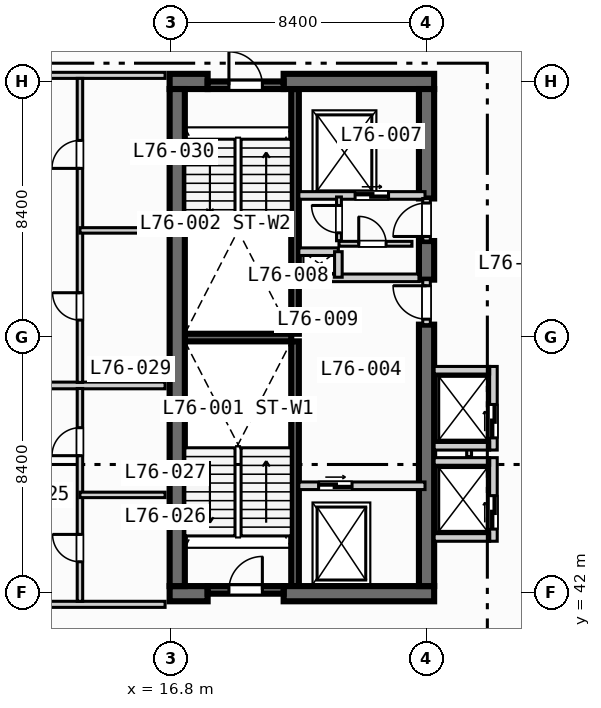
"""IFC4 building model, lengths in metres.
Left out: names, types, materials, properties, quantities, classifications, styles, units other than length and angle.
Written with IfcOpenShell. Run it as: python <this file> out.ifc"""

import sys

from ifc_helpers import new_model, si_unit, direction, frame, frame_2d, origin, place, context, subcontext, project, spatial, rectangle, extrude, element, fill, save


model = new_model("IFC4")
c1 = context("Model", 3, precision=1e-05, world=origin(), true_north=direction((0.0, 1.0)))
c2 = subcontext(c1, "Body", "Model", "MODEL_VIEW")
j1 = project(units=[si_unit("LENGTHUNIT", "METRE"), si_unit("PLANEANGLEUNIT", "RADIAN")], contexts=[c1])
p1 = place(None, origin())
s1 = spatial("IfcSite", under=j1, at=p1, CompositionType="ELEMENT")
p2 = place(p1, origin())
s2 = spatial("IfcBuilding", under=s1, at=p2, CompositionType="ELEMENT")
p3 = place(p2, frame((0.0, 0.0, 308.6)))
s3 = spatial("IfcBuildingStorey", under=s2, at=p3, CompositionType="ELEMENT", Elevation=308.6)
for number, where, z_axis, x_axis in (
    (1, (20.875, 42.2, 0.0), (0.0, 0.0, 1.0), (0.0, 1.0, 0.0)),
    (2, (20.875, 50.5, 0.0), (0.0, 0.0, 1.0), (0.0, 1.0, 0.0)),
):
    element("IfcWall", number, at=place(p3, frame(where, z_axis=z_axis, x_axis=x_axis)), inside=s3, PredefinedType="SOLIDWALL", context=c2, shape_type="SweptSolid", body=[
        extrude(rectangle(XDim=8.05, YDim=0.25, at=frame_2d((4.025, 0.0))), origin(), (0.0, 0.0, 1.0), 3.67),
    ])
p4 = place(p3, frame((17.25, 50.375, 0.0), z_axis=(0.0, 0.0, 1.0), x_axis=(1.0, 0.0, 0.0)))
e3 = element("IfcWall", 3, at=p4, inside=s3, PredefinedType="SOLIDWALL", context=c2, shape_type="SweptSolid", body=[
    extrude(rectangle(XDim=3.5, YDim=0.25, at=frame_2d((1.75, 0.0))), origin(), (0.0, 0.0, 1.0), 3.67),
])
p5 = place(p3, frame((16.75, 41.95, 0.0), z_axis=(0.0, 0.0, 1.0), x_axis=(1.0, 0.0, 0.0)))
e4 = element("IfcWall", 4, at=p5, inside=s3, PredefinedType="SHEAR", context=c2, shape_type="SweptSolid", body=[
    extrude(rectangle(XDim=1.25, YDim=0.5, at=frame_2d((0.625, 0.0))), origin(), (0.0, 0.0, 1.0), 3.67),
])
p6 = place(p3, frame((20.5, 41.95, 0.0), z_axis=(0.0, 0.0, 1.0), x_axis=(1.0, 0.0, 0.0)))
e5 = element("IfcWall", 5, at=p6, inside=s3, PredefinedType="SHEAR", context=c2, shape_type="SweptSolid", body=[
    extrude(rectangle(XDim=4.95, YDim=0.5, at=frame_2d((2.475, 0.0))), origin(), (0.0, 0.0, 1.0), 3.67),
])
p7 = place(p3, frame((16.75, 58.8, 0.0), z_axis=(0.0, 0.0, 1.0), x_axis=(1.0, 0.0, 0.0)))
e6 = element("IfcWall", 6, at=p7, inside=s3, PredefinedType="SHEAR", context=c2, shape_type="SweptSolid", body=[
    extrude(rectangle(XDim=1.25, YDim=0.5, at=frame_2d((0.625, 0.0))), origin(), (0.0, 0.0, 1.0), 3.67),
])
p8 = place(p3, frame((20.5, 58.8, 0.0), z_axis=(0.0, 0.0, 1.0), x_axis=(1.0, 0.0, 0.0)))
e7 = element("IfcWall", 7, at=p8, inside=s3, PredefinedType="SHEAR", context=c2, shape_type="SweptSolid", body=[
    extrude(rectangle(XDim=4.95, YDim=0.5, at=frame_2d((2.475, 0.0))), origin(), (0.0, 0.0, 1.0), 3.67),
])
p9 = place(p3, frame((17.0, 42.2, 0.0), z_axis=(0.0, 0.0, 1.0), x_axis=(0.0, 1.0, 0.0)))
e8 = element("IfcWall", 8, at=p9, inside=s3, PredefinedType="SHEAR", context=c2, shape_type="SweptSolid", body=[
    extrude(rectangle(XDim=16.35, YDim=0.5, at=frame_2d((8.175, 0.0))), origin(), (0.0, 0.0, 1.0), 3.67),
])
p10 = place(p3, frame((25.2, 42.2, 0.0), z_axis=(0.0, 0.0, 1.0), x_axis=(0.0, 1.0, 0.0)))
e9 = element("IfcWall", 9, at=p10, inside=s3, PredefinedType="SHEAR", context=c2, shape_type="SweptSolid", body=[
    extrude(rectangle(XDim=8.6, YDim=0.5, at=frame_2d((4.3, 0.0))), origin(), (0.0, 0.0, 1.0), 3.67),
])
p11 = place(p3, frame((25.2, 52.28, 0.0), z_axis=(0.0, 0.0, 1.0), x_axis=(0.0, 1.0, 0.0)))
e10 = element("IfcWall", 10, at=p11, inside=s3, PredefinedType="SHEAR", context=c2, shape_type="SweptSolid", body=[
    extrude(rectangle(XDim=1.27, YDim=0.5, at=frame_2d((0.635, 0.0))), origin(), (0.0, 0.0, 1.0), 3.67),
])
p12 = place(p3, frame((25.2, 54.95, 0.0), z_axis=(0.0, 0.0, 1.0), x_axis=(0.0, 1.0, 0.0)))
e11 = element("IfcWall", 11, at=p12, inside=s3, PredefinedType="SHEAR", context=c2, shape_type="SweptSolid", body=[
    extrude(rectangle(XDim=3.6, YDim=0.5, at=frame_2d((1.8, 0.0))), origin(), (0.0, 0.0, 1.0), 3.67),
])
p13 = place(p3, frame((18.0, 42.075, 0.0), z_axis=(0.0, 0.0, 1.0), x_axis=(1.0, 0.0, 0.0)))
e12 = element("IfcWall", 12, at=p13, inside=s3, PredefinedType="SOLIDWALL", context=c2, shape_type="SweptSolid", body=[
    extrude(rectangle(XDim=2.5, YDim=0.25, at=frame_2d((1.25, 0.0))), origin(), (0.0, 0.0, 1.0), 3.67),
])
p14 = place(p13, frame((0.7, 0.0, 0.0)))
e13 = element("IfcOpeningElement", 13, at=p14, cuts=e12, PredefinedType="OPENING", context=c2, shape_type="SweptSolid", body=[
    extrude(rectangle(XDim=1.1, YDim=2.15, at=frame_2d((0.55, 1.075))), frame((0.0, 0.135, 0.0), z_axis=(0.0, -1.0, 0.0), x_axis=(1.0, 0.0, 0.0)), (0.0, 0.0, 1.0), 0.27),
])
p15 = place(p3, frame((18.0, 58.675, 0.0), z_axis=(0.0, 0.0, 1.0), x_axis=(1.0, 0.0, 0.0)))
e14 = element("IfcWall", 14, at=p15, inside=s3, PredefinedType="SOLIDWALL", context=c2, shape_type="SweptSolid", body=[
    extrude(rectangle(XDim=2.5, YDim=0.25, at=frame_2d((1.25, 0.0))), origin(), (0.0, 0.0, 1.0), 3.67),
])
p16 = place(p15, frame((0.7, 0.0, 0.0)))
e15 = element("IfcOpeningElement", 15, at=p16, cuts=e14, PredefinedType="OPENING", context=c2, shape_type="SweptSolid", body=[
    extrude(rectangle(XDim=1.1, YDim=2.15, at=frame_2d((0.55, 1.075))), frame((0.0, 0.135, 0.0), z_axis=(0.0, -1.0, 0.0), x_axis=(1.0, 0.0, 0.0)), (0.0, 0.0, 1.0), 0.27),
])
p17 = place(p3, frame((21.0, 45.5, 0.0), z_axis=(0.0, 0.0, 1.0), x_axis=(1.0, 0.0, 0.0)))
e16 = element("IfcWall", 16, at=p17, inside=s3, PredefinedType="SOLIDWALL", context=c2, shape_type="SweptSolid", body=[
    extrude(rectangle(XDim=4.15, YDim=0.25, at=frame_2d((2.075, 0.0))), origin(), (0.0, 0.0, 1.0), 3.67),
])
p18 = place(p17, frame((0.65, 0.0, 0.0)))
e17 = element("IfcOpeningElement", 17, at=p18, cuts=e16, PredefinedType="OPENING", context=c2, shape_type="SweptSolid", body=[
    extrude(rectangle(XDim=1.1, YDim=2.15, at=frame_2d((0.55, 1.075))), frame((0.0, 0.135, 0.0), z_axis=(0.0, -1.0, 0.0), x_axis=(1.0, 0.0, 0.0)), (0.0, 0.0, 1.0), 0.27),
])
p19 = place(p3, frame((25.2, 50.8, 0.0), z_axis=(0.0, 0.0, 1.0), x_axis=(0.0, 1.0, 0.0)))
e18 = element("IfcWall", 18, at=p19, inside=s3, PredefinedType="SOLIDWALL", context=c2, shape_type="SweptSolid", body=[
    extrude(rectangle(XDim=1.48, YDim=0.25, at=frame_2d((0.74, 0.0))), origin(), (0.0, 0.0, 1.0), 3.67),
])
p20 = place(p19, frame((0.18, 0.0, 0.0)))
e19 = element("IfcOpeningElement", 19, at=p20, cuts=e18, PredefinedType="OPENING", context=c2, shape_type="SweptSolid", body=[
    extrude(rectangle(XDim=1.1, YDim=2.15, at=frame_2d((0.55, 1.075))), frame((0.0, 0.135, 0.0), z_axis=(0.0, -1.0, 0.0), x_axis=(1.0, 0.0, 0.0)), (0.0, 0.0, 1.0), 0.27),
])
p21 = place(p3, frame((21.0, 52.34, 0.0), z_axis=(0.0, 0.0, 1.0), x_axis=(1.0, 0.0, 0.0)))
e20 = element("IfcWall", 20, at=p21, inside=s3, PredefinedType="SOLIDWALL", context=c2, shape_type="SweptSolid", body=[
    extrude(rectangle(XDim=3.95, YDim=0.25, at=frame_2d((1.975, 0.0))), origin(), (0.0, 0.0, 1.0), 3.67),
])
p22 = place(p3, frame((21.0, 55.05, 0.0), z_axis=(0.0, 0.0, 1.0), x_axis=(1.0, 0.0, 0.0)))
e21 = element("IfcWall", 21, at=p22, inside=s3, PredefinedType="SOLIDWALL", context=c2, shape_type="SweptSolid", body=[
    extrude(rectangle(XDim=4.15, YDim=0.25, at=frame_2d((2.075, 0.0))), origin(), (0.0, 0.0, 1.0), 3.67),
])
p23 = place(p22, frame((1.85, 0.0, 0.0)))
e22 = element("IfcOpeningElement", 22, at=p23, cuts=e21, PredefinedType="OPENING", context=c2, shape_type="SweptSolid", body=[
    extrude(rectangle(XDim=1.1, YDim=2.15, at=frame_2d((0.55, 1.075))), frame((0.0, 0.135, 0.0), z_axis=(0.0, -1.0, 0.0), x_axis=(1.0, 0.0, 0.0)), (0.0, 0.0, 1.0), 0.27),
])
p24 = place(p3, frame((25.2, 53.55, 0.0), z_axis=(0.0, 0.0, 1.0), x_axis=(0.0, 1.0, 0.0)))
e23 = element("IfcWall", 23, at=p24, inside=s3, PredefinedType="SOLIDWALL", context=c2, shape_type="SweptSolid", body=[
    extrude(rectangle(XDim=1.4, YDim=0.25, at=frame_2d((0.7, 0.0))), origin(), (0.0, 0.0, 1.0), 3.67),
])
p25 = place(p24, frame((0.15, 0.0, 0.0)))
e24 = element("IfcOpeningElement", 24, at=p25, cuts=e23, PredefinedType="OPENING", context=c2, shape_type="SweptSolid", body=[
    extrude(rectangle(XDim=1.1, YDim=2.15, at=frame_2d((0.55, 1.075))), frame((0.0, 0.135, 0.0), z_axis=(0.0, -1.0, 0.0), x_axis=(1.0, 0.0, 0.0)), (0.0, 0.0, 1.0), 0.27),
])
p26 = place(p3, frame((21.0, 53.2, 0.0), z_axis=(0.0, 0.0, 1.0), x_axis=(1.0, 0.0, 0.0)))
e25 = element("IfcWall", 25, at=p26, inside=s3, PredefinedType="SOLIDWALL", context=c2, shape_type="SweptSolid", body=[
    extrude(rectangle(XDim=1.3, YDim=0.25, at=frame_2d((0.65, 0.0))), origin(), (0.0, 0.0, 1.0), 3.67),
])
p27 = place(p3, frame((22.3, 52.36, 0.0), z_axis=(0.0, 0.0, 1.0), x_axis=(0.0, 1.0, 0.0)))
e26 = element("IfcWall", 26, at=p27, inside=s3, PredefinedType="SOLIDWALL", context=c2, shape_type="SweptSolid", body=[
    extrude(rectangle(XDim=0.84, YDim=0.25, at=frame_2d((0.42, 0.0))), origin(), (0.0, 0.0, 1.0), 3.67),
])
p28 = place(p3, frame((22.32, 53.56, 0.0), z_axis=(0.0, 0.0, 1.0), x_axis=(0.0, 1.0, 0.0)))
e27 = element("IfcWall", 27, at=p28, inside=s3, PredefinedType="PARTITIONING", context=c2, shape_type="SweptSolid", body=[
    extrude(rectangle(XDim=1.44, YDim=0.16, at=frame_2d((0.72, 0.0))), origin(), (0.0, 0.0, 1.0), 3.67),
])
p29 = place(p28, frame((0.26, 0.0, 0.0)))
e28 = element("IfcOpeningElement", 28, at=p29, cuts=e27, PredefinedType="OPENING", context=c2, shape_type="SweptSolid", body=[
    extrude(rectangle(XDim=0.9, YDim=2.1, at=frame_2d((0.45, 1.05))), frame((0.0, 0.09, 0.0), z_axis=(0.0, -1.0, 0.0), x_axis=(1.0, 0.0, 0.0)), (0.0, 0.0, 1.0), 0.18),
])
p30 = place(p3, frame((22.32, 53.46, 0.0), z_axis=(0.0, 0.0, 1.0), x_axis=(1.0, 0.0, 0.0)))
e29 = element("IfcWall", 29, at=p30, inside=s3, PredefinedType="PARTITIONING", context=c2, shape_type="SweptSolid", body=[
    extrude(rectangle(XDim=2.4, YDim=0.16, at=frame_2d((1.2, 0.0))), origin(), (0.0, 0.0, 1.0), 3.67),
])
p31 = place(p30, frame((0.65, 0.0, 0.0)))
e30 = element("IfcOpeningElement", 30, at=p31, cuts=e29, PredefinedType="OPENING", context=c2, shape_type="SweptSolid", body=[
    extrude(rectangle(XDim=0.9, YDim=2.1, at=frame_2d((0.45, 1.05))), frame((0.0, 0.09, 0.0), z_axis=(0.0, -1.0, 0.0), x_axis=(1.0, 0.0, 0.0)), (0.0, 0.0, 1.0), 0.18),
])
p32 = place(p3, frame((27.4, 43.675, 0.0), z_axis=(0.0, 0.0, 1.0), x_axis=(0.0, 1.0, 0.0)))
e31 = element("IfcWall", 31, at=p32, inside=s3, PredefinedType="SOLIDWALL", context=c2, shape_type="SweptSolid", body=[
    extrude(rectangle(XDim=2.75, YDim=0.25, at=frame_2d((1.375, 0.0))), origin(), (0.0, 0.0, 1.0), 3.67),
])
p33 = place(p32, frame((0.4, 0.0, 0.0)))
e32 = element("IfcOpeningElement", 32, at=p33, cuts=e31, PredefinedType="OPENING", context=c2, shape_type="SweptSolid", body=[
    extrude(rectangle(XDim=1.1, YDim=2.15, at=frame_2d((0.55, 1.075))), frame((0.0, 0.135, 0.0), z_axis=(0.0, -1.0, 0.0), x_axis=(1.0, 0.0, 0.0)), (0.0, 0.0, 1.0), 0.27),
])
for number, where, z_axis, x_axis in (
    (33, (25.45, 43.8, 0.0), (0.0, 0.0, 1.0), (1.0, 0.0, 0.0)),
    (34, (25.45, 46.3, 0.0), (0.0, 0.0, 1.0), (1.0, 0.0, 0.0)),
):
    element("IfcWall", number, at=place(p3, frame(where, z_axis=z_axis, x_axis=x_axis)), inside=s3, PredefinedType="SOLIDWALL", context=c2, shape_type="SweptSolid", body=[
        extrude(rectangle(XDim=1.825, YDim=0.25, at=frame_2d((0.913, 0.0))), origin(), (0.0, 0.0, 1.0), 3.67),
    ])
p34 = place(p3, frame((26.6, 46.46, 0.0), z_axis=(0.0, 0.0, 1.0), x_axis=(0.0, 1.0, 0.0)))
e35 = element("IfcWall", 35, at=p34, inside=s3, PredefinedType="PARTITIONING", context=c2, shape_type="SweptSolid", body=[
    extrude(rectangle(XDim=0.88, YDim=0.16, at=frame_2d((0.44, 0.0))), origin(), (0.0, 0.0, 1.0), 3.67),
])
p35 = place(p3, frame((27.4, 46.675, 0.0), z_axis=(0.0, 0.0, 1.0), x_axis=(0.0, 1.0, 0.0)))
e36 = element("IfcWall", 36, at=p35, inside=s3, PredefinedType="SOLIDWALL", context=c2, shape_type="SweptSolid", body=[
    extrude(rectangle(XDim=2.75, YDim=0.25, at=frame_2d((1.375, 0.0))), origin(), (0.0, 0.0, 1.0), 3.67),
])
p36 = place(p35, frame((0.4, 0.0, 0.0)))
e37 = element("IfcOpeningElement", 37, at=p36, cuts=e36, PredefinedType="OPENING", context=c2, shape_type="SweptSolid", body=[
    extrude(rectangle(XDim=1.1, YDim=2.15, at=frame_2d((0.55, 1.075))), frame((0.0, 0.135, 0.0), z_axis=(0.0, -1.0, 0.0), x_axis=(1.0, 0.0, 0.0)), (0.0, 0.0, 1.0), 0.27),
])
for number, where, z_axis, x_axis in (
    (38, (25.45, 46.8, 0.0), (0.0, 0.0, 1.0), (1.0, 0.0, 0.0)),
    (39, (25.45, 49.3, 0.0), (0.0, 0.0, 1.0), (1.0, 0.0, 0.0)),
):
    element("IfcWall", number, at=place(p3, frame(where, z_axis=z_axis, x_axis=x_axis)), inside=s3, PredefinedType="SOLIDWALL", context=c2, shape_type="SweptSolid", body=[
        extrude(rectangle(XDim=1.825, YDim=0.25, at=frame_2d((0.913, 0.0))), origin(), (0.0, 0.0, 1.0), 3.67),
    ])
p37 = place(p3, frame((8.65, 41.6, 0.0), z_axis=(0.0, 0.0, 1.0), x_axis=(1.0, 0.0, 0.0)))
e40 = element("IfcWall", 40, at=p37, inside=s3, PredefinedType="PARTITIONING", context=c2, shape_type="SweptSolid", body=[
    extrude(rectangle(XDim=7.95, YDim=0.2, at=frame_2d((3.975, 0.0))), origin(), (0.0, 0.0, 1.0), 3.67),
])
p38 = place(p37, frame((2.0, 0.0, 0.0)))
e41 = element("IfcOpeningElement", 41, at=p38, cuts=e40, PredefinedType="OPENING", context=c2, shape_type="SweptSolid", body=[
    extrude(rectangle(XDim=1.0, YDim=2.15, at=frame_2d((0.5, 1.075))), frame((0.0, 0.11, 0.0), z_axis=(0.0, -1.0, 0.0), x_axis=(1.0, 0.0, 0.0)), (0.0, 0.0, 1.0), 0.22),
])
p39 = place(p3, frame((8.65, 59.0, 0.0), z_axis=(0.0, 0.0, 1.0), x_axis=(1.0, 0.0, 0.0)))
e42 = element("IfcWall", 42, at=p39, inside=s3, PredefinedType="PARTITIONING", context=c2, shape_type="SweptSolid", body=[
    extrude(rectangle(XDim=7.95, YDim=0.2, at=frame_2d((3.975, 0.0))), origin(), (0.0, 0.0, 1.0), 3.07),
])
p40 = place(p39, frame((2.0, 0.0, 0.0)))
e43 = element("IfcOpeningElement", 43, at=p40, cuts=e42, PredefinedType="OPENING", context=c2, shape_type="SweptSolid", body=[
    extrude(rectangle(XDim=1.0, YDim=2.15, at=frame_2d((0.5, 1.075))), frame((0.0, 0.11, 0.0), z_axis=(0.0, -1.0, 0.0), x_axis=(1.0, 0.0, 0.0)), (0.0, 0.0, 1.0), 0.22),
])
p41 = place(p3, frame((8.65, 48.8, 0.0), z_axis=(0.0, 0.0, 1.0), x_axis=(1.0, 0.0, 0.0)))
e44 = element("IfcWall", 44, at=p41, inside=s3, PredefinedType="PARTITIONING", context=c2, shape_type="SweptSolid", body=[
    extrude(rectangle(XDim=7.95, YDim=0.22, at=frame_2d((3.975, 0.0))), origin(), (0.0, 0.0, 1.0), 3.67),
])
p42 = place(p3, frame((13.8, 41.7, 0.0), z_axis=(0.0, 0.0, 1.0), x_axis=(0.0, 1.0, 0.0)))
e45 = element("IfcWall", 45, at=p42, inside=s3, PredefinedType="PLUMBINGWALL", context=c2, shape_type="SweptSolid", body=[
    extrude(rectangle(XDim=7.0, YDim=0.18, at=frame_2d((3.5, 0.0))), origin(), (0.0, 0.0, 1.0), 3.67),
])
p43 = place(p42, frame((1.3, 0.0, 0.0)))
e46 = element("IfcOpeningElement", 46, at=p43, cuts=e45, PredefinedType="OPENING", context=c2, shape_type="SweptSolid", body=[
    extrude(rectangle(XDim=0.9, YDim=2.1, at=frame_2d((0.45, 1.05))), frame((0.0, 0.1, 0.0), z_axis=(0.0, -1.0, 0.0), x_axis=(1.0, 0.0, 0.0)), (0.0, 0.0, 1.0), 0.2),
])
p44 = place(p42, frame((4.79, 0.0, 0.0)))
e47 = element("IfcOpeningElement", 47, at=p44, cuts=e45, PredefinedType="OPENING", context=c2, shape_type="SweptSolid", body=[
    extrude(rectangle(XDim=0.92, YDim=2.1, at=frame_2d((0.46, 1.05))), frame((0.0, 0.1, 0.0), z_axis=(0.0, -1.0, 0.0), x_axis=(1.0, 0.0, 0.0)), (0.0, 0.0, 1.0), 0.2),
])
p45 = place(p3, frame((13.8, 45.2, 0.0), z_axis=(0.0, 0.0, 1.0), x_axis=(1.0, 0.0, 0.0)))
e48 = element("IfcWall", 48, at=p45, inside=s3, PredefinedType="PLUMBINGWALL", context=c2, shape_type="SweptSolid", body=[
    extrude(rectangle(XDim=2.8, YDim=0.18, at=frame_2d((1.4, 0.0))), origin(), (0.0, 0.0, 1.0), 3.67),
])
p46 = place(p3, frame((13.8, 48.9, 0.0), z_axis=(0.0, 0.0, 1.0), x_axis=(0.0, 1.0, 0.0)))
e49 = element("IfcWall", 49, at=p46, inside=s3, PredefinedType="PLUMBINGWALL", context=c2, shape_type="SweptSolid", body=[
    extrude(rectangle(XDim=10.0, YDim=0.18, at=frame_2d((5.0, 0.0))), origin(), (0.0, 0.0, 1.0), 3.67),
])
p47 = place(p46, frame((2.05, 0.0, 0.0)))
e50 = element("IfcOpeningElement", 50, at=p47, cuts=e49, PredefinedType="OPENING", context=c2, shape_type="SweptSolid", body=[
    extrude(rectangle(XDim=0.9, YDim=2.1, at=frame_2d((0.45, 1.05))), frame((0.0, 0.1, 0.0), z_axis=(0.0, -1.0, 0.0), x_axis=(1.0, 0.0, 0.0)), (0.0, 0.0, 1.0), 0.2),
])
p48 = place(p46, frame((7.04, 0.0, 0.0)))
e51 = element("IfcOpeningElement", 51, at=p48, cuts=e49, PredefinedType="OPENING", context=c2, shape_type="SweptSolid", body=[
    extrude(rectangle(XDim=0.92, YDim=2.1, at=frame_2d((0.46, 1.05))), frame((0.0, 0.1, 0.0), z_axis=(0.0, -1.0, 0.0), x_axis=(1.0, 0.0, 0.0)), (0.0, 0.0, 1.0), 0.2),
])
p49 = place(p3, frame((13.8, 53.9, 0.0), z_axis=(0.0, 0.0, 1.0), x_axis=(1.0, 0.0, 0.0)))
e52 = element("IfcWall", 52, at=p49, inside=s3, PredefinedType="PLUMBINGWALL", context=c2, shape_type="SweptSolid", body=[
    extrude(rectangle(XDim=2.8, YDim=0.18, at=frame_2d((1.4, 0.0))), origin(), (0.0, 0.0, 1.0), 3.67),
])
p50 = place(p14, origin())
e53 = element("IfcDoor", 53, at=p50, inside=s3, OperationType="SINGLE_SWING_RIGHT", PredefinedType="DOOR", context=c2, shape_type="SweptSolid", body=[
    extrude(rectangle(XDim=1.1, YDim=2.15, at=frame_2d((0.55, 1.075))), frame((0.0, 0.025, 0.0), z_axis=(0.0, -1.0, 0.0), x_axis=(1.0, 0.0, 0.0)), (0.0, 0.0, 1.0), 0.05),
])
fill(e13, e53)
p51 = place(p16, origin())
e54 = element("IfcDoor", 54, at=p51, inside=s3, OperationType="SINGLE_SWING_LEFT", PredefinedType="DOOR", context=c2, shape_type="SweptSolid", body=[
    extrude(rectangle(XDim=1.1, YDim=2.15, at=frame_2d((0.55, 1.075))), frame((0.0, 0.025, 0.0), z_axis=(0.0, -1.0, 0.0), x_axis=(1.0, 0.0, 0.0)), (0.0, 0.0, 1.0), 0.05),
])
fill(e15, e54)
p52 = place(p18, origin())
e55 = element("IfcDoor", 55, at=p52, inside=s3, OperationType="SLIDING_TO_LEFT", PredefinedType="DOOR", context=c2, shape_type="SweptSolid", body=[
    extrude(rectangle(XDim=1.1, YDim=2.15, at=frame_2d((0.55, 1.075))), frame((0.0, 0.025, 0.0), z_axis=(0.0, -1.0, 0.0), x_axis=(1.0, 0.0, 0.0)), (0.0, 0.0, 1.0), 0.05),
])
fill(e17, e55)
p53 = place(p20, origin())
e56 = element("IfcDoor", 56, at=p53, inside=s3, OperationType="SINGLE_SWING_RIGHT", PredefinedType="DOOR", context=c2, shape_type="SweptSolid", body=[
    extrude(rectangle(XDim=1.1, YDim=2.15, at=frame_2d((0.55, 1.075))), frame((0.0, 0.025, 0.0), z_axis=(0.0, -1.0, 0.0), x_axis=(1.0, 0.0, 0.0)), (0.0, 0.0, 1.0), 0.05),
])
fill(e19, e56)
p54 = place(p23, origin())
e57 = element("IfcDoor", 57, at=p54, inside=s3, OperationType="SLIDING_TO_LEFT", PredefinedType="DOOR", context=c2, shape_type="SweptSolid", body=[
    extrude(rectangle(XDim=1.1, YDim=2.15, at=frame_2d((0.55, 1.075))), frame((0.0, 0.025, 0.0), z_axis=(0.0, -1.0, 0.0), x_axis=(1.0, 0.0, 0.0)), (0.0, 0.0, 1.0), 0.05),
])
fill(e22, e57)
p55 = place(p25, origin())
e58 = element("IfcDoor", 58, at=p55, inside=s3, OperationType="SINGLE_SWING_LEFT", PredefinedType="DOOR", context=c2, shape_type="SweptSolid", body=[
    extrude(rectangle(XDim=1.1, YDim=2.15, at=frame_2d((0.55, 1.075))), frame((0.0, 0.025, 0.0), z_axis=(0.0, -1.0, 0.0), x_axis=(1.0, 0.0, 0.0)), (0.0, 0.0, 1.0), 0.05),
])
fill(e24, e58)
p56 = place(p29, origin())
e59 = element("IfcDoor", 59, at=p56, inside=s3, OperationType="SINGLE_SWING_RIGHT", PredefinedType="DOOR", context=c2, shape_type="SweptSolid", body=[
    extrude(rectangle(XDim=0.9, YDim=2.1, at=frame_2d((0.45, 1.05))), frame((0.0, 0.025, 0.0), z_axis=(0.0, -1.0, 0.0), x_axis=(1.0, 0.0, 0.0)), (0.0, 0.0, 1.0), 0.05),
])
fill(e28, e59)
p57 = place(p31, origin())
e60 = element("IfcDoor", 60, at=p57, inside=s3, OperationType="SINGLE_SWING_LEFT", PredefinedType="DOOR", context=c2, shape_type="SweptSolid", body=[
    extrude(rectangle(XDim=0.9, YDim=2.1, at=frame_2d((0.45, 1.05))), frame((0.0, 0.025, 0.0), z_axis=(0.0, -1.0, 0.0), x_axis=(1.0, 0.0, 0.0)), (0.0, 0.0, 1.0), 0.05),
])
fill(e30, e60)
p58 = place(p33, origin())
e61 = element("IfcDoor", 61, at=p58, inside=s3, OperationType="SLIDING_TO_LEFT", PredefinedType="DOOR", context=c2, shape_type="SweptSolid", body=[
    extrude(rectangle(XDim=1.1, YDim=2.15, at=frame_2d((0.55, 1.075))), frame((0.0, 0.025, 0.0), z_axis=(0.0, -1.0, 0.0), x_axis=(1.0, 0.0, 0.0)), (0.0, 0.0, 1.0), 0.05),
])
fill(e32, e61)
p59 = place(p36, origin())
e62 = element("IfcDoor", 62, at=p59, inside=s3, OperationType="SLIDING_TO_LEFT", PredefinedType="DOOR", context=c2, shape_type="SweptSolid", body=[
    extrude(rectangle(XDim=1.1, YDim=2.15, at=frame_2d((0.55, 1.075))), frame((0.0, 0.025, 0.0), z_axis=(0.0, -1.0, 0.0), x_axis=(1.0, 0.0, 0.0)), (0.0, 0.0, 1.0), 0.05),
])
fill(e37, e62)
p60 = place(p43, origin())
e63 = element("IfcDoor", 63, at=p60, inside=s3, OperationType="SINGLE_SWING_RIGHT", PredefinedType="DOOR", context=c2, shape_type="SweptSolid", body=[
    extrude(rectangle(XDim=0.9, YDim=2.1, at=frame_2d((0.45, 1.05))), frame((0.0, 0.025, 0.0), z_axis=(0.0, -1.0, 0.0), x_axis=(1.0, 0.0, 0.0)), (0.0, 0.0, 1.0), 0.05),
])
fill(e46, e63)
p61 = place(p44, origin())
e64 = element("IfcDoor", 64, at=p61, inside=s3, OperationType="SINGLE_SWING_LEFT", PredefinedType="DOOR", context=c2, shape_type="SweptSolid", body=[
    extrude(rectangle(XDim=0.92, YDim=2.1, at=frame_2d((0.46, 1.05))), frame((0.0, 0.025, 0.0), z_axis=(0.0, -1.0, 0.0), x_axis=(1.0, 0.0, 0.0)), (0.0, 0.0, 1.0), 0.05),
])
fill(e47, e64)
p62 = place(p47, origin())
e65 = element("IfcDoor", 65, at=p62, inside=s3, OperationType="SINGLE_SWING_RIGHT", PredefinedType="DOOR", context=c2, shape_type="SweptSolid", body=[
    extrude(rectangle(XDim=0.9, YDim=2.1, at=frame_2d((0.45, 1.05))), frame((0.0, 0.025, 0.0), z_axis=(0.0, -1.0, 0.0), x_axis=(1.0, 0.0, 0.0)), (0.0, 0.0, 1.0), 0.05),
])
fill(e50, e65)
p63 = place(p48, origin())
e66 = element("IfcDoor", 66, at=p63, inside=s3, OperationType="SINGLE_SWING_LEFT", PredefinedType="DOOR", context=c2, shape_type="SweptSolid", body=[
    extrude(rectangle(XDim=0.92, YDim=2.1, at=frame_2d((0.46, 1.05))), frame((0.0, 0.025, 0.0), z_axis=(0.0, -1.0, 0.0), x_axis=(1.0, 0.0, 0.0)), (0.0, 0.0, 1.0), 0.05),
])
fill(e51, e66)
save(model, sys.argv[1])
